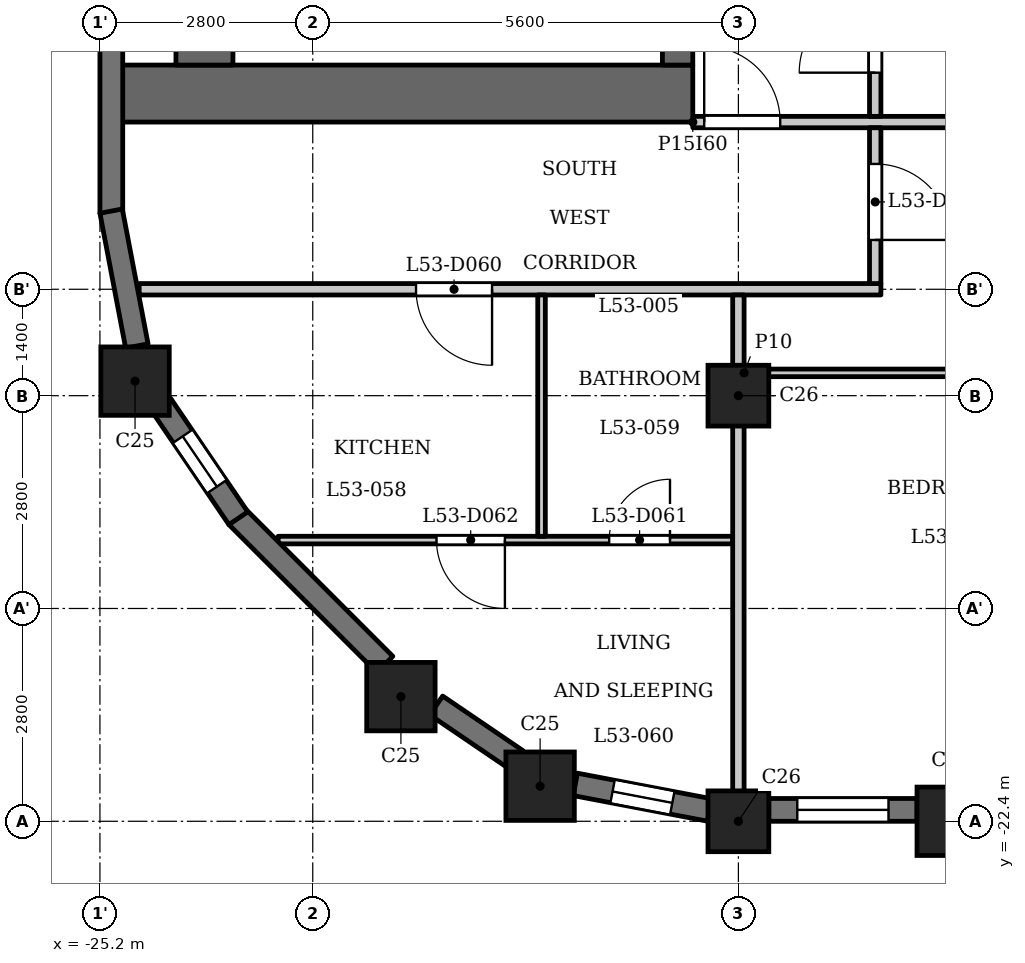
"""IFC4 building model, lengths in metres.
Left out: names, types, materials, properties, quantities, classifications, styles, units other than length and angle.
Written with IfcOpenShell. Run it as: python <this file> out.ifc"""

import sys

from ifc_helpers import new_model, si_unit, direction, frame, frame_2d, origin, origin_2d, place, context, subcontext, project, spatial, rectangle, extrude, element, fill, save


model = new_model("IFC4")
c1 = context("Model", 3, precision=1e-05, world=origin(), true_north=direction((0.0, 1.0)))
c2 = subcontext(c1, "Body", "Model", "MODEL_VIEW")
j1 = project(units=[si_unit("LENGTHUNIT", "METRE"), si_unit("PLANEANGLEUNIT", "RADIAN")], contexts=[c1])
p1 = place(None, origin())
s1 = spatial("IfcSite", under=j1, at=p1, CompositionType="ELEMENT")
p2 = place(p1, origin())
s2 = spatial("IfcBuilding", under=s1, at=p2, CompositionType="ELEMENT")
p3 = place(p2, frame((0.0, 0.0, 206.4)))
s3 = spatial("IfcBuildingStorey", under=s2, at=p3, CompositionType="ELEMENT", Elevation=206.4)
for number, where, z_axis, x_axis in (
    (1, (-19.409, -21.938, 0.0), (0.0, 0.0, 1.0), (1.0, 0.0, 0.0)),
    (2, (-14.0, -22.4, 0.0), (0.0, 0.0, 1.0), (1.0, 0.0, 0.0)),
    (3, (-24.738, -16.609, 0.0), (0.0, 0.0, 1.0), (1.0, 0.0, 0.0)),
    (4, (-21.24, -20.76, 0.0), (0.0, 0.0, 1.0), (1.0, 0.0, 0.0)),
):
    element("IfcColumn", number, at=place(p3, frame(where, z_axis=z_axis, x_axis=x_axis)), inside=s3, PredefinedType="COLUMN", context=c2, shape_type="SweptSolid", body=[
        extrude(rectangle(XDim=0.9, YDim=0.9, at=origin_2d()), origin(), (0.0, 0.0, 1.0), 3.5),
    ])
for number, where, z_axis, x_axis in (
    (5, (-16.8, -22.4, 0.0), (0.0, 0.0, 1.0), (1.0, 0.0, 0.0)),
    (6, (-16.8, -16.8, 0.0), (0.0, 0.0, 1.0), (1.0, 0.0, 0.0)),
):
    element("IfcColumn", number, at=place(p3, frame(where, z_axis=z_axis, x_axis=x_axis)), inside=s3, PredefinedType="COLUMN", context=c2, shape_type="SweptSolid", body=[
        extrude(rectangle(XDim=0.8, YDim=0.8, at=origin_2d()), origin(), (0.0, 0.0, 1.0), 3.5),
    ])
p4 = place(p3, frame((-23.397, -18.391, 0.0), z_axis=(0.0, 0.0, 1.0), x_axis=(0.707106781187, -0.707106781187, 0.0)))
e7 = element("IfcWall", 7, at=p4, inside=s3, PredefinedType="SOLIDWALL", context=c2, shape_type="SweptSolid", body=[
    extrude(rectangle(XDim=2.75, YDim=0.3, at=frame_2d((1.375, 0.0))), origin(), (0.0, 0.0, 1.0), 2.5),
])
p5 = place(p3, frame((-20.775, -20.876, 0.0), z_axis=(0.0, 0.0, 1.0), x_axis=(0.827075824828, -0.562090366388, 0.0)))
e8 = element("IfcWall", 8, at=p5, inside=s3, PredefinedType="SOLIDWALL", context=c2, shape_type="SweptSolid", body=[
    extrude(rectangle(XDim=1.277, YDim=0.3, at=frame_2d((0.638, 0.0))), origin(), (0.0, 0.0, 1.0), 2.5),
])
p6 = place(p3, frame((-18.946, -21.914, 0.0), z_axis=(0.0, 0.0, 1.0), x_axis=(0.98230529033, -0.187286722942, 0.0)))
e9 = element("IfcWall", 9, at=p6, inside=s3, PredefinedType="SOLIDWALL", context=c2, shape_type="SweptSolid", body=[
    extrude(rectangle(XDim=1.799, YDim=0.3, at=frame_2d((0.899, 0.0))), origin(), (0.0, 0.0, 1.0), 2.5),
])
p7 = place(p6, frame((0.5, 0.0, 0.6)))
e10 = element("IfcOpeningElement", 10, at=p7, cuts=e9, PredefinedType="OPENING", context=c2, shape_type="SweptSolid", body=[
    extrude(rectangle(XDim=0.8, YDim=1.55, at=frame_2d((0.4, 0.775))), frame((0.0, 0.16, 0.0), z_axis=(0.0, -1.0, 0.0), x_axis=(1.0, 0.0, 0.0)), (0.0, 0.0, 1.0), 0.32),
])
p8 = place(p3, frame((-16.4, -22.25, 0.0), z_axis=(0.0, 0.0, 1.0), x_axis=(1.0, 0.0, 0.0)))
e11 = element("IfcWall", 11, at=p8, inside=s3, PredefinedType="SOLIDWALL", context=c2, shape_type="SweptSolid", body=[
    extrude(rectangle(XDim=1.95, YDim=0.3, at=frame_2d((0.975, 0.0))), origin(), (0.0, 0.0, 1.0), 2.5),
])
p9 = place(p8, frame((0.375, 0.0, 0.6)))
e12 = element("IfcOpeningElement", 12, at=p9, cuts=e11, PredefinedType="OPENING", context=c2, shape_type="SweptSolid", body=[
    extrude(rectangle(XDim=1.2, YDim=1.55, at=frame_2d((0.6, 0.775))), frame((0.0, 0.16, 0.0), z_axis=(0.0, -1.0, 0.0), x_axis=(1.0, 0.0, 0.0)), (0.0, 0.0, 1.0), 0.32),
])
p10 = place(p3, frame((-25.05, -11.65, 0.0), z_axis=(0.0, 0.0, 1.0), x_axis=(0.0, -1.0, 0.0)))
e13 = element("IfcWall", 13, at=p10, inside=s3, PredefinedType="SOLIDWALL", context=c2, shape_type="SweptSolid", body=[
    extrude(rectangle(XDim=2.75, YDim=0.3, at=frame_2d((1.375, 0.0))), origin(), (0.0, 0.0, 1.0), 2.5),
])
p11 = place(p3, frame((-25.053, -14.372, 0.0), z_axis=(0.0, 0.0, 1.0), x_axis=(0.187348135549, -0.982293579388, 0.0)))
e14 = element("IfcWall", 14, at=p11, inside=s3, PredefinedType="SOLIDWALL", context=c2, shape_type="SweptSolid", body=[
    extrude(rectangle(XDim=1.806, YDim=0.3, at=frame_2d((0.903, 0.0))), origin(), (0.0, 0.0, 1.0), 2.5),
])
p12 = place(p3, frame((-24.394, -16.919, 0.0), z_axis=(0.0, 0.0, 1.0), x_axis=(0.562040093569, -0.827109988588, 0.0)))
e15 = element("IfcWall", 15, at=p12, inside=s3, PredefinedType="SOLIDWALL", context=c2, shape_type="SweptSolid", body=[
    extrude(rectangle(XDim=1.806, YDim=0.3, at=frame_2d((0.903, 0.0))), origin(), (0.0, 0.0, 1.0), 2.5),
])
p13 = place(p12, frame((0.503, 0.0, 0.6)))
e16 = element("IfcOpeningElement", 16, at=p13, cuts=e15, PredefinedType="OPENING", context=c2, shape_type="SweptSolid", body=[
    extrude(rectangle(XDim=0.8, YDim=1.55, at=frame_2d((0.4, 0.775))), frame((0.0, 0.16, 0.0), z_axis=(0.0, -1.0, 0.0), x_axis=(1.0, 0.0, 0.0)), (0.0, 0.0, 1.0), 0.32),
])
p14 = place(p3, frame((-17.4, -12.825, 0.0), z_axis=(0.0, 0.0, 1.0), x_axis=(-1.0, 0.0, 0.0)))
e17 = element("IfcWall", 17, at=p14, inside=s3, PredefinedType="SHEAR", context=c2, shape_type="SweptSolid", body=[
    extrude(rectangle(XDim=7.6, YDim=0.75, at=frame_2d((3.8, 0.0))), origin(), (0.0, 0.0, 1.0), 3.2),
])
p15 = place(p3, frame((-17.6, -12.45, 0.0), z_axis=(0.0, 0.0, 1.0), x_axis=(0.0, 1.0, 0.0)))
e18 = element("IfcWall", 18, at=p15, inside=s3, PredefinedType="SHEAR", context=c2, shape_type="SweptSolid", body=[
    extrude(rectangle(XDim=24.9, YDim=0.4, at=frame_2d((12.45, 0.0))), origin(), (0.0, 0.0, 1.0), 3.2),
])
p16 = place(p15, frame((8.65, 0.0, 0.0)))
e19 = element("IfcOpeningElement", 19, at=p16, cuts=e18, PredefinedType="OPENING", context=c2, shape_type="SweptSolid", body=[
    extrude(rectangle(XDim=0.9, YDim=2.1, at=frame_2d((0.45, 1.05))), frame((0.0, 0.21, 0.0), z_axis=(0.0, -1.0, 0.0), x_axis=(1.0, 0.0, 0.0)), (0.0, 0.0, 1.0), 0.42),
])
p17 = place(p15, frame((15.6, 0.0, 0.0)))
e20 = element("IfcOpeningElement", 20, at=p17, cuts=e18, PredefinedType="OPENING", context=c2, shape_type="SweptSolid", body=[
    extrude(rectangle(XDim=1.1, YDim=2.1, at=frame_2d((0.55, 1.05))), frame((0.0, 0.21, 0.0), z_axis=(0.0, -1.0, 0.0), x_axis=(1.0, 0.0, 0.0)), (0.0, 0.0, 1.0), 0.42),
])
p18 = place(p15, frame((18.0, 0.0, 0.0)))
e21 = element("IfcOpeningElement", 21, at=p18, cuts=e18, PredefinedType="OPENING", context=c2, shape_type="SweptSolid", body=[
    extrude(rectangle(XDim=1.1, YDim=2.1, at=frame_2d((0.55, 1.05))), frame((0.0, 0.21, 0.0), z_axis=(0.0, -1.0, 0.0), x_axis=(1.0, 0.0, 0.0)), (0.0, 0.0, 1.0), 0.42),
])
p19 = place(p15, frame((23.025, 0.0, 0.0)))
e22 = element("IfcOpeningElement", 22, at=p19, cuts=e18, PredefinedType="OPENING", context=c2, shape_type="SweptSolid", body=[
    extrude(rectangle(XDim=1.1, YDim=2.1, at=frame_2d((0.55, 1.05))), frame((0.0, 0.21, 0.0), z_axis=(0.0, -1.0, 0.0), x_axis=(1.0, 0.0, 0.0)), (0.0, 0.0, 1.0), 0.42),
])
p20 = place(p15, frame((0.775, 0.0, 0.0)))
e23 = element("IfcOpeningElement", 23, at=p20, cuts=e18, PredefinedType="OPENING", context=c2, shape_type="SweptSolid", body=[
    extrude(rectangle(XDim=1.1, YDim=2.1, at=frame_2d((0.55, 1.05))), frame((0.0, 0.21, 0.0), z_axis=(0.0, -1.0, 0.0), x_axis=(1.0, 0.0, 0.0)), (0.0, 0.0, 1.0), 0.42),
])
p21 = place(p15, frame((12.925, 0.0, 0.0)))
e24 = element("IfcOpeningElement", 24, at=p21, cuts=e18, PredefinedType="OPENING", context=c2, shape_type="SweptSolid", body=[
    extrude(rectangle(XDim=1.8, YDim=2.1, at=frame_2d((0.9, 1.05))), frame((0.0, 0.21, 0.0), z_axis=(0.0, -1.0, 0.0), x_axis=(1.0, 0.0, 0.0)), (0.0, 0.0, 1.0), 0.42),
])
p22 = place(p3, frame((-23.825, -12.45, 0.0), z_axis=(0.0, 0.0, 1.0), x_axis=(0.0, 1.0, 0.0)))
e25 = element("IfcWall", 25, at=p22, inside=s3, PredefinedType="SHEAR", context=c2, shape_type="SweptSolid", body=[
    extrude(rectangle(XDim=24.9, YDim=0.75, at=frame_2d((12.45, 0.0))), origin(), (0.0, 0.0, 1.0), 3.2),
])
p23 = place(p3, frame((-22.856, -18.7, 0.0), z_axis=(0.0, 0.0, 1.0), x_axis=(1.0, 0.0, 0.0)))
e26 = element("IfcWall", 26, at=p23, inside=s3, PredefinedType="PARTITIONING", context=c2, shape_type="SweptSolid", body=[
    extrude(rectangle(XDim=5.981, YDim=0.1, at=frame_2d((2.99, 0.0))), origin(), (0.0, 0.0, 1.0), 3.2),
])
p24 = place(p23, frame((4.356, 0.0, 0.0)))
e27 = element("IfcOpeningElement", 27, at=p24, cuts=e26, PredefinedType="OPENING", context=c2, shape_type="SweptSolid", body=[
    extrude(rectangle(XDim=0.8, YDim=2.1, at=frame_2d((0.4, 1.05))), frame((0.0, 0.06, 0.0), z_axis=(0.0, -1.0, 0.0), x_axis=(1.0, 0.0, 0.0)), (0.0, 0.0, 1.0), 0.12),
])
p25 = place(p23, frame((2.084, 0.0, 0.0)))
e28 = element("IfcOpeningElement", 28, at=p25, cuts=e26, PredefinedType="OPENING", context=c2, shape_type="SweptSolid", body=[
    extrude(rectangle(XDim=0.9, YDim=2.1, at=frame_2d((0.45, 1.05))), frame((0.0, 0.06, 0.0), z_axis=(0.0, -1.0, 0.0), x_axis=(1.0, 0.0, 0.0)), (0.0, 0.0, 1.0), 0.12),
])
p26 = place(p3, frame((-16.725, -16.5, 0.0), z_axis=(0.0, 0.0, 1.0), x_axis=(1.0, 0.0, 0.0)))
e29 = element("IfcWall", 29, at=p26, inside=s3, PredefinedType="PARTITIONING", context=c2, shape_type="SweptSolid", body=[
    extrude(rectangle(XDim=33.45, YDim=0.1, at=frame_2d((16.725, 0.0))), origin(), (0.0, 0.0, 1.0), 3.2),
])
p27 = place(p26, frame((4.075, 0.0, 0.0)))
e30 = element("IfcOpeningElement", 30, at=p27, cuts=e29, PredefinedType="OPENING", context=c2, shape_type="SweptSolid", body=[
    extrude(rectangle(XDim=0.9, YDim=2.1, at=frame_2d((0.45, 1.05))), frame((0.0, 0.06, 0.0), z_axis=(0.0, -1.0, 0.0), x_axis=(1.0, 0.0, 0.0)), (0.0, 0.0, 1.0), 0.12),
])
p28 = place(p26, frame((6.175, 0.0, 0.0)))
e31 = element("IfcOpeningElement", 31, at=p28, cuts=e29, PredefinedType="OPENING", context=c2, shape_type="SweptSolid", body=[
    extrude(rectangle(XDim=0.9, YDim=2.1, at=frame_2d((0.45, 1.05))), frame((0.0, 0.06, 0.0), z_axis=(0.0, -1.0, 0.0), x_axis=(1.0, 0.0, 0.0)), (0.0, 0.0, 1.0), 0.12),
])
p29 = place(p26, frame((30.575, 0.0, 0.0)))
e32 = element("IfcOpeningElement", 32, at=p29, cuts=e29, PredefinedType="OPENING", context=c2, shape_type="SweptSolid", body=[
    extrude(rectangle(XDim=0.9, YDim=2.1, at=frame_2d((0.45, 1.05))), frame((0.0, 0.06, 0.0), z_axis=(0.0, -1.0, 0.0), x_axis=(1.0, 0.0, 0.0)), (0.0, 0.0, 1.0), 0.12),
])
p30 = place(p26, frame((22.975, 0.0, 0.0)))
e33 = element("IfcOpeningElement", 33, at=p30, cuts=e29, PredefinedType="OPENING", context=c2, shape_type="SweptSolid", body=[
    extrude(rectangle(XDim=0.9, YDim=2.1, at=frame_2d((0.45, 1.05))), frame((0.0, 0.06, 0.0), z_axis=(0.0, -1.0, 0.0), x_axis=(1.0, 0.0, 0.0)), (0.0, 0.0, 1.0), 0.12),
])
p31 = place(p3, frame((-24.684, -15.4, 0.0), z_axis=(0.0, 0.0, 1.0), x_axis=(1.0, 0.0, 0.0)))
e34 = element("IfcWall", 34, at=p31, inside=s3, PredefinedType="PARTITIONING", context=c2, shape_type="SweptSolid", body=[
    extrude(rectangle(XDim=9.759, YDim=0.15, at=frame_2d((4.879, 0.0))), origin(), (0.0, 0.0, 1.0), 3.2),
])
p32 = place(p31, frame((3.643, 0.0, 0.0)))
e35 = element("IfcOpeningElement", 35, at=p32, cuts=e34, PredefinedType="OPENING", context=c2, shape_type="SweptSolid", body=[
    extrude(rectangle(XDim=1.0, YDim=2.1, at=frame_2d((0.5, 1.05))), frame((0.0, 0.085, 0.0), z_axis=(0.0, -1.0, 0.0), x_axis=(1.0, 0.0, 0.0)), (0.0, 0.0, 1.0), 0.17),
])
p33 = place(p3, frame((-17.4, -13.2, 0.0), z_axis=(0.0, 0.0, 1.0), x_axis=(1.0, 0.0, 0.0)))
e36 = element("IfcWall", 36, at=p33, inside=s3, PredefinedType="PARTITIONING", context=c2, shape_type="SweptSolid", body=[
    extrude(rectangle(XDim=34.8, YDim=0.15, at=frame_2d((17.4, 0.0))), origin(), (0.0, 0.0, 1.0), 3.2),
])
p34 = place(p33, frame((0.15, 0.0, 0.0)))
e37 = element("IfcOpeningElement", 37, at=p34, cuts=e36, PredefinedType="OPENING", context=c2, shape_type="SweptSolid", body=[
    extrude(rectangle(XDim=1.0, YDim=2.1, at=frame_2d((0.5, 1.05))), frame((0.0, 0.085, 0.0), z_axis=(0.0, -1.0, 0.0), x_axis=(1.0, 0.0, 0.0)), (0.0, 0.0, 1.0), 0.17),
])
p35 = place(p33, frame((33.55, 0.0, 0.0)))
e38 = element("IfcOpeningElement", 38, at=p35, cuts=e36, PredefinedType="OPENING", context=c2, shape_type="SweptSolid", body=[
    extrude(rectangle(XDim=1.0, YDim=2.1, at=frame_2d((0.5, 1.05))), frame((0.0, 0.085, 0.0), z_axis=(0.0, -1.0, 0.0), x_axis=(1.0, 0.0, 0.0)), (0.0, 0.0, 1.0), 0.17),
])
p36 = place(p3, frame((-19.39, -18.65, 0.0), z_axis=(0.0, 0.0, 1.0), x_axis=(0.0, 1.0, 0.0)))
e39 = element("IfcWall", 39, at=p36, inside=s3, PredefinedType="PARTITIONING", context=c2, shape_type="SweptSolid", body=[
    extrude(rectangle(XDim=3.175, YDim=0.1, at=frame_2d((1.587, 0.0))), origin(), (0.0, 0.0, 1.0), 3.2),
])
p37 = place(p3, frame((-16.8, -22.31, 0.0), z_axis=(0.0, 0.0, 1.0), x_axis=(0.0, 1.0, 0.0)))
e40 = element("IfcWall", 40, at=p37, inside=s3, PredefinedType="PARTITIONING", context=c2, shape_type="SweptSolid", body=[
    extrude(rectangle(XDim=6.835, YDim=0.15, at=frame_2d((3.417, 0.0))), origin(), (0.0, 0.0, 1.0), 2.55),
])
p38 = place(p3, frame((-15.0, -15.325, 0.0), z_axis=(0.0, 0.0, 1.0), x_axis=(0.0, 1.0, 0.0)))
e41 = element("IfcWall", 41, at=p38, inside=s3, PredefinedType="PARTITIONING", context=c2, shape_type="SweptSolid", body=[
    extrude(rectangle(XDim=2.05, YDim=0.15, at=frame_2d((1.025, 0.0))), origin(), (0.0, 0.0, 1.0), 3.2),
])
p39 = place(p38, frame((0.574, 0.0, 0.0)))
e42 = element("IfcOpeningElement", 42, at=p39, cuts=e41, PredefinedType="OPENING", context=c2, shape_type="SweptSolid", body=[
    extrude(rectangle(XDim=1.0, YDim=2.1, at=frame_2d((0.5, 1.05))), frame((0.0, 0.085, 0.0), z_axis=(0.0, -1.0, 0.0), x_axis=(1.0, 0.0, 0.0)), (0.0, 0.0, 1.0), 0.17),
])
p40 = place(p3, frame((-15.0, -13.125, 0.0), z_axis=(0.0, 0.0, 1.0), x_axis=(0.0, 1.0, 0.0)))
e43 = element("IfcWall", 43, at=p40, inside=s3, PredefinedType="PARTITIONING", context=c2, shape_type="SweptSolid", body=[
    extrude(rectangle(XDim=6.356, YDim=0.15, at=frame_2d((3.178, 0.0))), origin(), (0.0, 0.0, 1.0), 3.2),
])
p41 = place(p40, frame((0.575, 0.0, 0.0)))
e44 = element("IfcOpeningElement", 44, at=p41, cuts=e43, PredefinedType="OPENING", context=c2, shape_type="SweptSolid", body=[
    extrude(rectangle(XDim=1.0, YDim=2.1, at=frame_2d((0.5, 1.05))), frame((0.0, 0.085, 0.0), z_axis=(0.0, -1.0, 0.0), x_axis=(1.0, 0.0, 0.0)), (0.0, 0.0, 1.0), 0.17),
])
p42 = place(p41, origin())
e45 = element("IfcDoor", 45, at=p42, inside=s3, OperationType="SINGLE_SWING_RIGHT", PredefinedType="DOOR", context=c2, shape_type="SweptSolid", body=[
    extrude(rectangle(XDim=1.0, YDim=2.1, at=frame_2d((0.5, 1.05))), frame((0.0, 0.025, 0.0), z_axis=(0.0, -1.0, 0.0), x_axis=(1.0, 0.0, 0.0)), (0.0, 0.0, 1.0), 0.05),
])
fill(e44, e45)
p43 = place(p34, origin())
e46 = element("IfcDoor", 46, at=p43, inside=s3, OperationType="SINGLE_SWING_RIGHT", PredefinedType="DOOR", context=c2, shape_type="SweptSolid", body=[
    extrude(rectangle(XDim=1.0, YDim=2.1, at=frame_2d((0.5, 1.05))), frame((0.0, 0.025, 0.0), z_axis=(0.0, -1.0, 0.0), x_axis=(1.0, 0.0, 0.0)), (0.0, 0.0, 1.0), 0.05),
])
fill(e37, e46)
p44 = place(p39, origin())
e47 = element("IfcDoor", 47, at=p44, inside=s3, OperationType="SINGLE_SWING_LEFT", PredefinedType="DOOR", context=c2, shape_type="SweptSolid", body=[
    extrude(rectangle(XDim=1.0, YDim=2.1, at=frame_2d((0.5, 1.05))), frame((0.0, 0.025, 0.0), z_axis=(0.0, -1.0, 0.0), x_axis=(1.0, 0.0, 0.0)), (0.0, 0.0, 1.0), 0.05),
])
fill(e42, e47)
p45 = place(p32, origin())
e48 = element("IfcDoor", 48, at=p45, inside=s3, OperationType="SINGLE_SWING_RIGHT", PredefinedType="DOOR", context=c2, shape_type="SweptSolid", body=[
    extrude(rectangle(XDim=1.0, YDim=2.1, at=frame_2d((0.5, 1.05))), frame((0.0, 0.025, 0.0), z_axis=(0.0, -1.0, 0.0), x_axis=(1.0, 0.0, 0.0)), (0.0, 0.0, 1.0), 0.05),
])
fill(e35, e48)
p46 = place(p24, origin())
e49 = element("IfcDoor", 49, at=p46, inside=s3, OperationType="SINGLE_SWING_LEFT", PredefinedType="DOOR", context=c2, shape_type="SweptSolid", body=[
    extrude(rectangle(XDim=0.8, YDim=2.1, at=frame_2d((0.4, 1.05))), frame((0.0, 0.025, 0.0), z_axis=(0.0, -1.0, 0.0), x_axis=(1.0, 0.0, 0.0)), (0.0, 0.0, 1.0), 0.05),
])
fill(e27, e49)
p47 = place(p25, origin())
e50 = element("IfcDoor", 50, at=p47, inside=s3, OperationType="SINGLE_SWING_RIGHT", PredefinedType="DOOR", context=c2, shape_type="SweptSolid", body=[
    extrude(rectangle(XDim=0.9, YDim=2.1, at=frame_2d((0.45, 1.05))), frame((0.0, 0.025, 0.0), z_axis=(0.0, -1.0, 0.0), x_axis=(1.0, 0.0, 0.0)), (0.0, 0.0, 1.0), 0.05),
])
fill(e28, e50)
p48 = place(p7, origin())
e51 = element("IfcWindow", 51, at=p48, inside=s3, PartitioningType="SINGLE_PANEL", PredefinedType="WINDOW", context=c2, shape_type="SweptSolid", body=[
    extrude(rectangle(XDim=0.8, YDim=1.55, at=frame_2d((0.4, 0.775))), frame((0.0, 0.03, 0.0), z_axis=(0.0, -1.0, 0.0), x_axis=(1.0, 0.0, 0.0)), (0.0, 0.0, 1.0), 0.06),
])
fill(e10, e51)
p49 = place(p9, origin())
e52 = element("IfcWindow", 52, at=p49, inside=s3, PartitioningType="SINGLE_PANEL", PredefinedType="WINDOW", context=c2, shape_type="SweptSolid", body=[
    extrude(rectangle(XDim=1.2, YDim=1.55, at=frame_2d((0.6, 0.775))), frame((0.0, 0.03, 0.0), z_axis=(0.0, -1.0, 0.0), x_axis=(1.0, 0.0, 0.0)), (0.0, 0.0, 1.0), 0.06),
])
fill(e12, e52)
p50 = place(p13, origin())
e53 = element("IfcWindow", 53, at=p50, inside=s3, PartitioningType="SINGLE_PANEL", PredefinedType="WINDOW", context=c2, shape_type="SweptSolid", body=[
    extrude(rectangle(XDim=0.8, YDim=1.55, at=frame_2d((0.4, 0.775))), frame((0.0, 0.03, 0.0), z_axis=(0.0, -1.0, 0.0), x_axis=(1.0, 0.0, 0.0)), (0.0, 0.0, 1.0), 0.06),
])
fill(e16, e53)
save(model, sys.argv[1])
